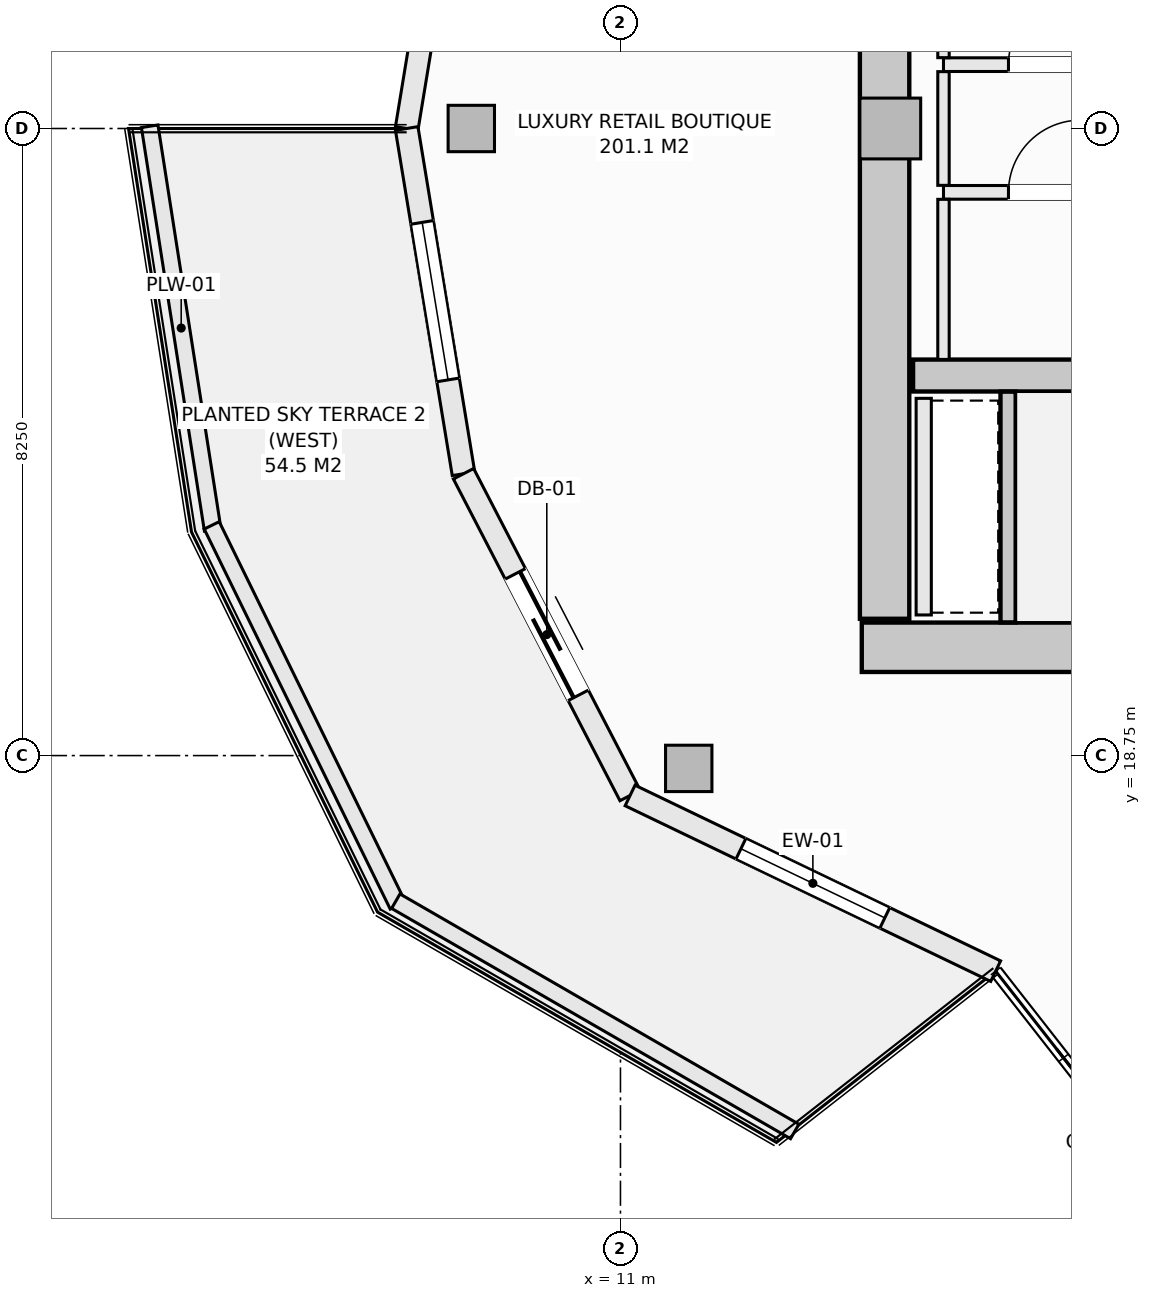
"""IFC4 building model, lengths in metres.
Left out: names, types, materials, properties, quantities, classifications, styles, units other than length and angle.
Written with IfcOpenShell. Run it as: python <this file> out.ifc"""

import sys

from ifc_helpers import new_model, si_unit, direction, frame, frame_2d, origin, origin_2d, place, context, subcontext, project, spatial, rectangle, hollow_rectangle, extrude, element, fill, save


model = new_model("IFC4")
c1 = context("Model", 3, precision=1e-05, world=origin(), true_north=direction((0.0, 1.0)))
c2 = subcontext(c1, "Body", "Model", "MODEL_VIEW")
j1 = project(units=[si_unit("LENGTHUNIT", "METRE"), si_unit("PLANEANGLEUNIT", "RADIAN")], contexts=[c1])
p1 = place(None, origin())
s1 = spatial("IfcSite", under=j1, at=p1, CompositionType="ELEMENT")
p2 = place(p1, origin())
s2 = spatial("IfcBuilding", under=s1, at=p2, CompositionType="ELEMENT")
p3 = place(p2, frame((0.0, 0.0, 169.9)))
s3 = spatial("IfcBuildingStorey", under=s2, at=p3, CompositionType="ELEMENT", Elevation=169.9)
p4 = place(p3, frame((14.175, 20.175, -0.27), z_axis=(0.0, 0.0, 1.0), x_axis=(1.0, 0.0, 0.0)))
e1 = element("IfcWall", 1, at=p4, inside=s3, PredefinedType="SHEAR", context=c2, shape_type="SweptSolid", body=[
    extrude(rectangle(XDim=13.65, YDim=0.65, at=frame_2d((6.825, 0.0))), origin(), (0.0, 0.0, 1.0), 3.4),
])
p5 = place(p3, frame((14.475, 20.55, -0.27), z_axis=(0.0, 0.0, 1.0), x_axis=(0.0, 1.0, 0.0)))
e2 = element("IfcWall", 2, at=p5, inside=s3, PredefinedType="SHEAR", context=c2, shape_type="SweptSolid", body=[
    extrude(rectangle(XDim=12.9, YDim=0.65, at=frame_2d((6.45, 0.0))), origin(), (0.0, 0.0, 1.0), 3.4),
])
p6 = place(p3, frame((14.85, 23.75, -0.27), z_axis=(0.0, 0.0, 1.0), x_axis=(1.0, 0.0, 0.0)))
e3 = element("IfcWall", 3, at=p6, inside=s3, PredefinedType="SHEAR", context=c2, shape_type="SweptSolid", body=[
    extrude(rectangle(XDim=7.3, YDim=0.42, at=frame_2d((3.65, 0.0))), origin(), (0.0, 0.0, 1.0), 3.4),
])
for number, where, z_axis, x_axis in (
    (4, (9.038, 27.0, -0.27), (0.0, 0.0, 1.0), (1.0, 0.0, 0.0)),
    (5, (11.898, 18.581, -0.27), (0.0, 0.0, 1.0), (1.0, 0.0, 0.0)),
):
    element("IfcColumn", number, at=place(p3, frame(where, z_axis=z_axis, x_axis=x_axis)), inside=s3, PredefinedType="COLUMN", context=c2, shape_type="SweptSolid", body=[
        extrude(hollow_rectangle(XDim=0.61, YDim=0.61, WallThickness=0.025, at=origin_2d()), origin(), (0.0, 0.0, 1.0), 3.4),
    ])
p7 = place(p3, frame((14.55, 27.0, -0.27), z_axis=(0.0, 0.0, 1.0), x_axis=(1.0, 0.0, 0.0)))
e6 = element("IfcColumn", 6, at=p7, inside=s3, PredefinedType="PILASTER", context=c2, shape_type="SweptSolid", body=[
    extrude(rectangle(XDim=0.8, YDim=0.8, at=origin_2d()), origin(), (0.0, 0.0, 1.0), 3.4),
])
p8 = place(p3, frame((8.188, 27.0, 0.0), z_axis=(0.0, 0.0, 1.0), x_axis=(0.162394765401, 0.986725868806, 0.0)))
e7 = element("IfcWall", 7, at=p8, inside=s3, PredefinedType="SOLIDWALL", context=c2, shape_type="SweptSolid", body=[
    extrude(rectangle(XDim=4.603, YDim=0.3, at=frame_2d((2.302, 0.0))), origin(), (0.0, 0.0, 1.0), 2.653),
])
p9 = place(p8, frame((1.252, 0.0, 0.74)))
e8 = element("IfcOpeningElement", 8, at=p9, cuts=e7, PredefinedType="OPENING", context=c2, shape_type="SweptSolid", body=[
    extrude(rectangle(XDim=2.1, YDim=1.7, at=frame_2d((1.05, 0.85))), frame((0.0, 0.16, 0.0), z_axis=(0.0, -1.0, 0.0), x_axis=(1.0, 0.0, 0.0)), (0.0, 0.0, 1.0), 0.32),
])
p10 = place(p3, frame((8.188, 27.0, 0.0), z_axis=(0.0, 0.0, 1.0), x_axis=(0.162394765401, -0.986725868806, 0.0)))
e9 = element("IfcWall", 9, at=p10, inside=s3, PredefinedType="SOLIDWALL", context=c2, shape_type="SweptSolid", body=[
    extrude(rectangle(XDim=4.603, YDim=0.3, at=frame_2d((2.302, 0.0))), origin(), (0.0, 0.0, 1.0), 2.653),
])
p11 = place(p10, frame((1.252, 0.0, 0.74)))
e10 = element("IfcOpeningElement", 10, at=p11, cuts=e9, PredefinedType="OPENING", context=c2, shape_type="SweptSolid", body=[
    extrude(rectangle(XDim=2.1, YDim=1.7, at=frame_2d((1.05, 0.85))), frame((0.0, 0.16, 0.0), z_axis=(0.0, -1.0, 0.0), x_axis=(1.0, 0.0, 0.0)), (0.0, 0.0, 1.0), 0.32),
])
p12 = place(p3, frame((8.935, 22.458, 0.0), z_axis=(0.0, 0.0, 1.0), x_axis=(0.459810251451, -0.888017191647, 0.0)))
e11 = element("IfcWall", 11, at=p12, inside=s3, PredefinedType="SOLIDWALL", context=c2, shape_type="SweptSolid", body=[
    extrude(rectangle(XDim=4.766, YDim=0.3, at=frame_2d((2.383, 0.0))), origin(), (0.0, 0.0, 1.0), 2.653),
])
p13 = place(p12, frame((1.483, 0.0, 0.0)))
e12 = element("IfcOpeningElement", 12, at=p13, cuts=e11, PredefinedType="OPENING", context=c2, shape_type="SweptSolid", body=[
    extrude(rectangle(XDim=1.8, YDim=2.25, at=frame_2d((0.9, 1.125))), frame((0.0, 0.16, 0.0), z_axis=(0.0, -1.0, 0.0), x_axis=(1.0, 0.0, 0.0)), (0.0, 0.0, 1.0), 0.32),
])
p14 = place(p3, frame((11.127, 18.225, 0.0), z_axis=(0.0, 0.0, 1.0), x_axis=(0.901353070301, -0.433085029363, 0.0)))
e13 = element("IfcWall", 13, at=p14, inside=s3, PredefinedType="SOLIDWALL", context=c2, shape_type="SweptSolid", body=[
    extrude(rectangle(XDim=5.336, YDim=0.3, at=frame_2d((2.668, 0.0))), origin(), (0.0, 0.0, 1.0), 2.653),
])
p15 = place(p14, frame((1.618, 0.0, 0.74)))
e14 = element("IfcOpeningElement", 14, at=p15, cuts=e13, PredefinedType="OPENING", context=c2, shape_type="SweptSolid", body=[
    extrude(rectangle(XDim=2.1, YDim=1.7, at=frame_2d((1.05, 0.85))), frame((0.0, 0.16, 0.0), z_axis=(0.0, -1.0, 0.0), x_axis=(1.0, 0.0, 0.0)), (0.0, 0.0, 1.0), 0.32),
])
p16 = place(p3, frame((4.806, 27.029, 0.0), z_axis=(0.0, 0.0, 1.0), x_axis=(0.154245214003, -0.988032597619, 0.0)))
e15 = element("IfcWall", 15, at=p16, inside=s3, PredefinedType="PARAPET", context=c2, shape_type="SweptSolid", body=[
    extrude(rectangle(XDim=5.374, YDim=0.22, at=frame_2d((2.687, 0.0))), origin(), (0.0, 0.0, 1.0), 0.52),
])
p17 = place(p3, frame((5.622, 21.779, 0.0), z_axis=(0.0, 0.0, 1.0), x_axis=(0.439637174641, -0.898175458735, 0.0)))
e16 = element("IfcWall", 16, at=p17, inside=s3, PredefinedType="PARAPET", context=c2, shape_type="SweptSolid", body=[
    extrude(rectangle(XDim=5.567, YDim=0.22, at=frame_2d((2.784, 0.0))), origin(), (0.0, 0.0, 1.0), 0.52),
])
p18 = place(p3, frame((8.044, 16.834, 0.0), z_axis=(0.0, 0.0, 1.0), x_axis=(0.866058128659, -0.499943314571, 0.0)))
e17 = element("IfcWall", 17, at=p18, inside=s3, PredefinedType="PARAPET", context=c2, shape_type="SweptSolid", body=[
    extrude(rectangle(XDim=6.06, YDim=0.22, at=frame_2d((3.03, 0.0))), origin(), (0.0, 0.0, 1.0), 0.52),
])
p19 = place(p3, frame((16.1, 20.502, -0.27), z_axis=(0.0, 0.0, 1.0), x_axis=(0.0, 1.0, 0.0)))
e18 = element("IfcWall", 18, at=p19, inside=s3, PredefinedType="SHEAR", context=c2, shape_type="SweptSolid", body=[
    extrude(rectangle(XDim=3.036, YDim=0.2, at=frame_2d((1.518, 0.0))), origin(), (0.0, 0.0, 1.0), 3.4),
])
p20 = place(p3, frame((14.99, 20.6, 0.0), z_axis=(0.0, 0.0, 1.0), x_axis=(0.0, 1.0, 0.0)))
e19 = element("IfcWall", 19, at=p20, inside=s3, PredefinedType="SOLIDWALL", context=c2, shape_type="SweptSolid", body=[
    extrude(rectangle(XDim=2.85, YDim=0.2, at=frame_2d((1.425, 0.0))), origin(), (0.0, 0.0, 1.0), 3.13),
])
p21 = place(p3, frame((15.25, 27.84, 0.0), z_axis=(0.0, 0.0, 1.0), x_axis=(1.0, 0.0, 0.0)))
e20 = element("IfcWall", 20, at=p21, inside=s3, PredefinedType="SOLIDWALL", context=c2, shape_type="SweptSolid", body=[
    extrude(rectangle(XDim=6.9, YDim=0.18, at=frame_2d((3.45, 0.0))), origin(), (0.0, 0.0, 1.0), 3.13),
])
p22 = place(p21, frame((5.02, 0.0, 0.0)))
e21 = element("IfcOpeningElement", 21, at=p22, cuts=e20, PredefinedType="OPENING", context=c2, shape_type="SweptSolid", body=[
    extrude(rectangle(XDim=0.95, YDim=2.1, at=frame_2d((0.475, 1.05))), frame((0.0, 0.1, 0.0), z_axis=(0.0, -1.0, 0.0), x_axis=(1.0, 0.0, 0.0)), (0.0, 0.0, 1.0), 0.2),
])
p23 = place(p21, frame((0.855, 0.0, 0.0)))
e22 = element("IfcOpeningElement", 22, at=p23, cuts=e20, PredefinedType="OPENING", context=c2, shape_type="SweptSolid", body=[
    extrude(rectangle(XDim=0.95, YDim=2.1, at=frame_2d((0.475, 1.05))), frame((0.0, 0.1, 0.0), z_axis=(0.0, -1.0, 0.0), x_axis=(1.0, 0.0, 0.0)), (0.0, 0.0, 1.0), 0.2),
])
p24 = place(p21, frame((2.9, 0.0, 0.0)))
e23 = element("IfcOpeningElement", 23, at=p24, cuts=e20, PredefinedType="OPENING", context=c2, shape_type="SweptSolid", body=[
    extrude(rectangle(XDim=0.95, YDim=2.1, at=frame_2d((0.475, 1.05))), frame((0.0, 0.1, 0.0), z_axis=(0.0, -1.0, 0.0), x_axis=(1.0, 0.0, 0.0)), (0.0, 0.0, 1.0), 0.2),
])
p25 = place(p3, frame((15.25, 26.16, 0.0), z_axis=(0.0, 0.0, 1.0), x_axis=(1.0, 0.0, 0.0)))
e24 = element("IfcWall", 24, at=p25, inside=s3, PredefinedType="SOLIDWALL", context=c2, shape_type="SweptSolid", body=[
    extrude(rectangle(XDim=6.9, YDim=0.18, at=frame_2d((3.45, 0.0))), origin(), (0.0, 0.0, 1.0), 3.13),
])
p26 = place(p25, frame((5.02, 0.0, 0.0)))
e25 = element("IfcOpeningElement", 25, at=p26, cuts=e24, PredefinedType="OPENING", context=c2, shape_type="SweptSolid", body=[
    extrude(rectangle(XDim=0.95, YDim=2.1, at=frame_2d((0.475, 1.05))), frame((0.0, 0.1, 0.0), z_axis=(0.0, -1.0, 0.0), x_axis=(1.0, 0.0, 0.0)), (0.0, 0.0, 1.0), 0.2),
])
p27 = place(p25, frame((0.855, 0.0, 0.0)))
e26 = element("IfcOpeningElement", 26, at=p27, cuts=e24, PredefinedType="OPENING", context=c2, shape_type="SweptSolid", body=[
    extrude(rectangle(XDim=0.95, YDim=2.1, at=frame_2d((0.475, 1.05))), frame((0.0, 0.1, 0.0), z_axis=(0.0, -1.0, 0.0), x_axis=(1.0, 0.0, 0.0)), (0.0, 0.0, 1.0), 0.2),
])
p28 = place(p25, frame((2.9, 0.0, 0.0)))
e27 = element("IfcOpeningElement", 27, at=p28, cuts=e24, PredefinedType="OPENING", context=c2, shape_type="SweptSolid", body=[
    extrude(rectangle(XDim=0.95, YDim=2.1, at=frame_2d((0.475, 1.05))), frame((0.0, 0.1, 0.0), z_axis=(0.0, -1.0, 0.0), x_axis=(1.0, 0.0, 0.0)), (0.0, 0.0, 1.0), 0.2),
])
p29 = place(p3, frame((15.25, 23.962, 0.0), z_axis=(0.0, 0.0, 1.0), x_axis=(0.0, 1.0, 0.0)))
e28 = element("IfcWall", 28, at=p29, inside=s3, PredefinedType="PARTITIONING", context=c2, shape_type="SweptSolid", body=[
    extrude(rectangle(XDim=2.106, YDim=0.15, at=frame_2d((1.053, 0.0))), origin(), (0.0, 0.0, 1.0), 3.13),
])
p30 = place(p3, frame((15.25, 26.252, 0.0), z_axis=(0.0, 0.0, 1.0), x_axis=(0.0, 1.0, 0.0)))
e29 = element("IfcWall", 29, at=p30, inside=s3, PredefinedType="PARTITIONING", context=c2, shape_type="SweptSolid", body=[
    extrude(rectangle(XDim=1.496, YDim=0.15, at=frame_2d((0.748, 0.0))), origin(), (0.0, 0.0, 1.0), 3.13),
])
p31 = place(p3, frame((15.25, 27.932, 0.0), z_axis=(0.0, 0.0, 1.0), x_axis=(0.0, 1.0, 0.0)))
e30 = element("IfcWall", 30, at=p31, inside=s3, PredefinedType="PARTITIONING", context=c2, shape_type="SweptSolid", body=[
    extrude(rectangle(XDim=2.106, YDim=0.15, at=frame_2d((1.053, 0.0))), origin(), (0.0, 0.0, 1.0), 3.13),
])
p32 = place(p11, origin())
e31 = element("IfcWindow", 31, at=p32, inside=s3, PartitioningType="SINGLE_PANEL", PredefinedType="WINDOW", context=c2, shape_type="SweptSolid", body=[
    extrude(rectangle(XDim=2.1, YDim=1.7, at=frame_2d((1.05, 0.85))), frame((0.0, 0.03, 0.0), z_axis=(0.0, -1.0, 0.0), x_axis=(1.0, 0.0, 0.0)), (0.0, 0.0, 1.0), 0.06),
])
fill(e10, e31)
p33 = place(p13, frame((1.8, 0.0, 0.0), z_axis=(0.0, 0.0, 1.0), x_axis=(-1.0, 0.0, 0.0)))
e32 = element("IfcDoor", 32, at=p33, inside=s3, OperationType="SLIDING_TO_LEFT", PredefinedType="DOOR", context=c2, shape_type="SweptSolid", body=[
    extrude(rectangle(XDim=1.8, YDim=2.25, at=frame_2d((0.9, 1.125))), frame((0.0, 0.025, 0.0), z_axis=(0.0, -1.0, 0.0), x_axis=(1.0, 0.0, 0.0)), (0.0, 0.0, 1.0), 0.05),
])
fill(e12, e32)
p34 = place(p15, origin())
e33 = element("IfcWindow", 33, at=p34, inside=s3, PartitioningType="SINGLE_PANEL", PredefinedType="WINDOW", context=c2, shape_type="SweptSolid", body=[
    extrude(rectangle(XDim=2.1, YDim=1.7, at=frame_2d((1.05, 0.85))), frame((0.0, 0.03, 0.0), z_axis=(0.0, -1.0, 0.0), x_axis=(1.0, 0.0, 0.0)), (0.0, 0.0, 1.0), 0.06),
])
fill(e14, e33)
p35 = place(p23, origin())
e34 = element("IfcDoor", 34, at=p35, inside=s3, OperationType="SINGLE_SWING_RIGHT", PredefinedType="DOOR", context=c2, shape_type="SweptSolid", body=[
    extrude(rectangle(XDim=0.95, YDim=2.1, at=frame_2d((0.475, 1.05))), frame((0.0, 0.025, 0.0), z_axis=(0.0, -1.0, 0.0), x_axis=(1.0, 0.0, 0.0)), (0.0, 0.0, 1.0), 0.05),
])
fill(e22, e34)
p36 = place(p27, origin())
e35 = element("IfcDoor", 35, at=p36, inside=s3, OperationType="SINGLE_SWING_RIGHT", PredefinedType="DOOR", context=c2, shape_type="SweptSolid", body=[
    extrude(rectangle(XDim=0.95, YDim=2.1, at=frame_2d((0.475, 1.05))), frame((0.0, 0.025, 0.0), z_axis=(0.0, -1.0, 0.0), x_axis=(1.0, 0.0, 0.0)), (0.0, 0.0, 1.0), 0.05),
])
fill(e26, e35)
save(model, sys.argv[1])
